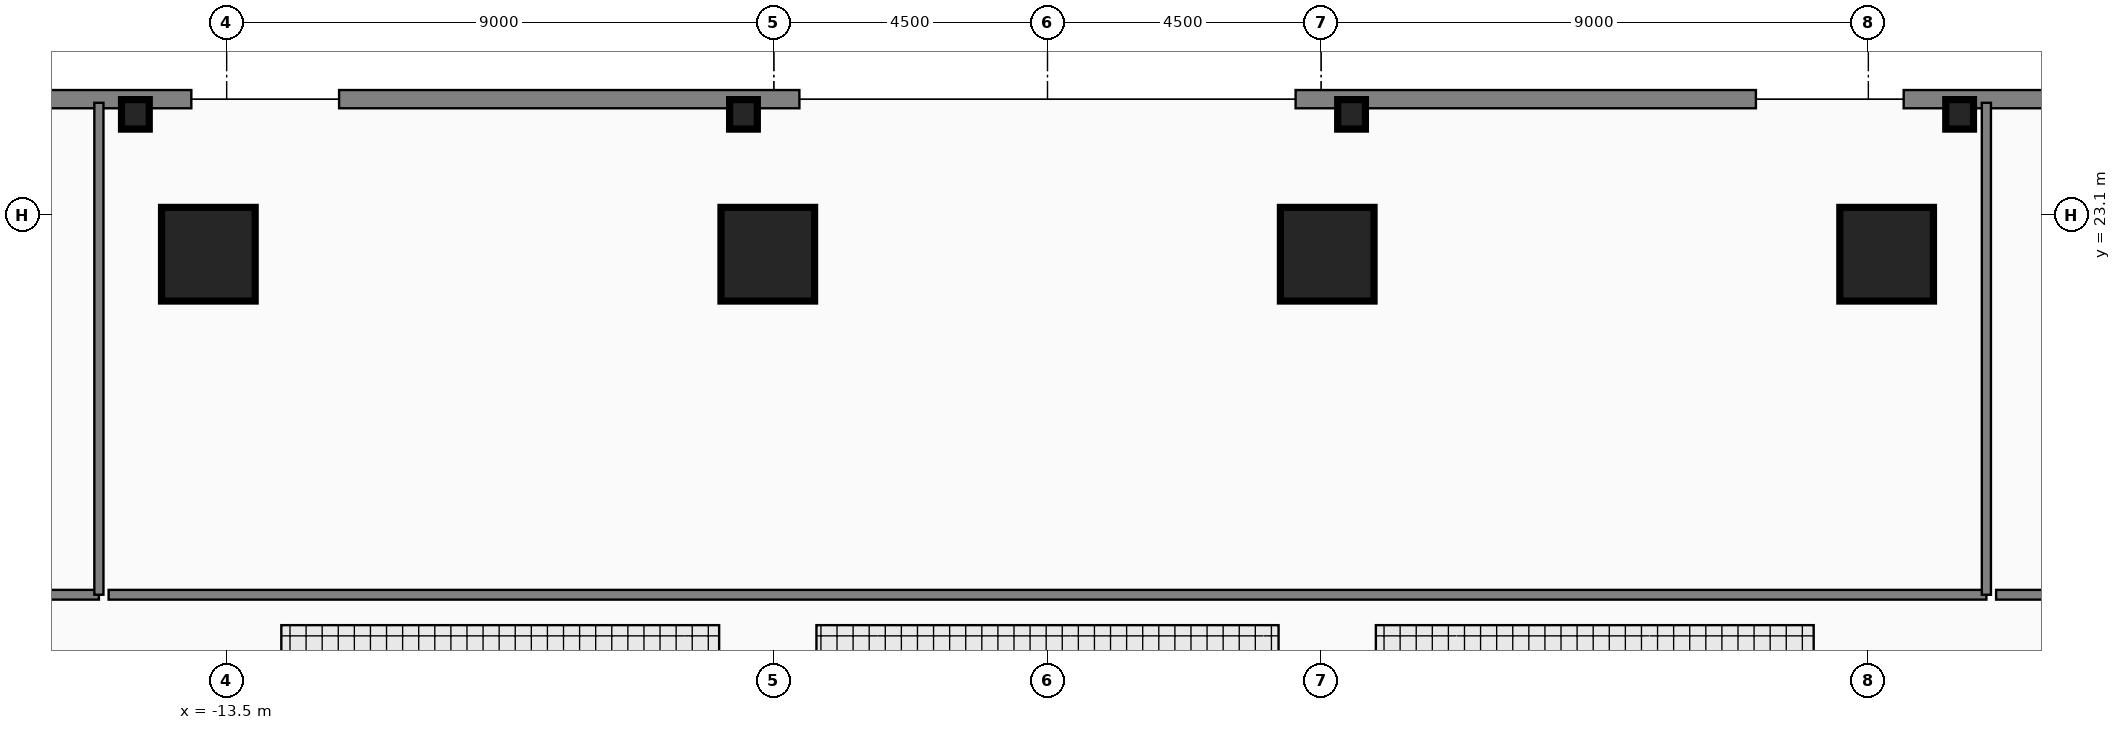
"""IFC4 building model, lengths in metres.
Left out: names, types, materials, properties, quantities, classifications, styles, units other than length and angle.
Written with IfcOpenShell. Run it as: python <this file> out.ifc"""

import sys

from ifc_helpers import new_model, si_unit, direction, frame, frame_2d, origin, origin_2d, place, context, subcontext, project, spatial, rectangle, i_section, extrude, element, fill, save


model = new_model("IFC4")
c1 = context("Model", 3, precision=1e-05, world=origin(), true_north=direction((0.0, 1.0)))
c2 = subcontext(c1, "Body", "Model", "MODEL_VIEW")
j1 = project(units=[si_unit("LENGTHUNIT", "METRE"), si_unit("PLANEANGLEUNIT", "RADIAN")], contexts=[c1])
p1 = place(None, origin())
s1 = spatial("IfcSite", under=j1, at=p1, CompositionType="ELEMENT")
p2 = place(p1, origin())
s2 = spatial("IfcBuilding", under=s1, at=p2, CompositionType="ELEMENT")
p3 = place(p2, origin())
s3 = spatial("IfcBuildingStorey", under=s2, at=p3, CompositionType="ELEMENT", Elevation=0.0)
for number, where, z_axis, x_axis in (
    (1, (-13.8, 22.45, 0.0), (0.0, 0.0, 1.0), (1.0, 0.0, 0.0)),
    (2, (-4.6, 22.45, 0.0), (0.0, 0.0, 1.0), (1.0, 0.0, 0.0)),
    (3, (4.6, 22.45, 0.0), (0.0, 0.0, 1.0), (1.0, 0.0, 0.0)),
    (4, (13.8, 22.45, 0.0), (0.0, 0.0, 1.0), (1.0, 0.0, 0.0)),
):
    element("IfcColumn", number, at=place(p3, frame(where, z_axis=z_axis, x_axis=x_axis)), inside=s3, PredefinedType="COLUMN", context=c2, shape_type="SweptSolid", body=[
        extrude(rectangle(XDim=1.5, YDim=1.5, at=origin_2d()), origin(), (0.0, 0.0, 1.0), 6.0),
    ])
for number, where, z_axis, x_axis in (
    (5, (-15.0, 24.75, -0.27), (0.0, 0.0, 1.0), (1.0, 0.0, 0.0)),
    (6, (-5.0, 24.75, -0.27), (0.0, 0.0, 1.0), (1.0, 0.0, 0.0)),
    (7, (5.0, 24.75, -0.27), (0.0, 0.0, 1.0), (1.0, 0.0, 0.0)),
    (8, (15.0, 24.75, -0.27), (0.0, 0.0, 1.0), (1.0, 0.0, 0.0)),
):
    element("IfcColumn", number, at=place(p3, frame(where, z_axis=z_axis, x_axis=x_axis)), inside=s3, PredefinedType="PILASTER", context=c2, shape_type="SweptSolid", body=[
        extrude(i_section(OverallWidth=0.416, OverallDepth=0.445, WebThickness=0.039, FlangeThickness=0.063, at=origin_2d()), origin(), (0.0, 0.0, 1.0), 6.02),
    ])
p4 = place(p3, frame((-28.35, 25.0, 0.0), z_axis=(0.0, 0.0, 1.0), x_axis=(1.0, 0.0, 0.0)))
e9 = element("IfcWall", 9, at=p4, inside=s3, PredefinedType="STANDARD", context=c2, shape_type="SweptSolid", body=[
    extrude(rectangle(XDim=14.27, YDim=0.3, at=frame_2d((7.135, 0.0))), origin(), (0.0, 0.0, 1.0), 5.75),
])
p5 = place(p4, frame((7.35, 0.0, 0.0)))
e10 = element("IfcOpeningElement", 10, at=p5, cuts=e9, PredefinedType="OPENING", context=c2, shape_type="SweptSolid", body=[
    extrude(rectangle(XDim=2.4, YDim=2.45, at=frame_2d((1.2, 1.225))), frame((0.0, 0.16, 0.0), z_axis=(0.0, -1.0, 0.0), x_axis=(1.0, 0.0, 0.0)), (0.0, 0.0, 1.0), 0.32),
])
p6 = place(p4, frame((4.25, 0.0, 0.9)))
e11 = element("IfcOpeningElement", 11, at=p6, cuts=e9, PredefinedType="OPENING", context=c2, shape_type="SweptSolid", body=[
    extrude(rectangle(XDim=2.4, YDim=2.2, at=frame_2d((1.2, 1.1))), frame((0.0, 0.16, 0.0), z_axis=(0.0, -1.0, 0.0), x_axis=(1.0, 0.0, 0.0)), (0.0, 0.0, 1.0), 0.32),
])
p7 = place(p3, frame((-11.65, 25.0, 0.0), z_axis=(0.0, 0.0, 1.0), x_axis=(1.0, 0.0, 0.0)))
e12 = element("IfcWall", 12, at=p7, inside=s3, PredefinedType="STANDARD", context=c2, shape_type="SweptSolid", body=[
    extrude(rectangle(XDim=7.57, YDim=0.3, at=frame_2d((3.785, 0.0))), origin(), (0.0, 0.0, 1.0), 5.75),
])
p8 = place(p7, frame((0.65, 0.0, 0.0)))
e13 = element("IfcOpeningElement", 13, at=p8, cuts=e12, PredefinedType="OPENING", context=c2, shape_type="SweptSolid", body=[
    extrude(rectangle(XDim=2.4, YDim=2.45, at=frame_2d((1.2, 1.225))), frame((0.0, 0.16, 0.0), z_axis=(0.0, -1.0, 0.0), x_axis=(1.0, 0.0, 0.0)), (0.0, 0.0, 1.0), 0.32),
])
p9 = place(p3, frame((4.08, 25.0, 0.0), z_axis=(0.0, 0.0, 1.0), x_axis=(1.0, 0.0, 0.0)))
e14 = element("IfcWall", 14, at=p9, inside=s3, PredefinedType="STANDARD", context=c2, shape_type="SweptSolid", body=[
    extrude(rectangle(XDim=7.57, YDim=0.3, at=frame_2d((3.785, 0.0))), origin(), (0.0, 0.0, 1.0), 5.75),
])
p10 = place(p9, frame((4.52, 0.0, 0.0)))
e15 = element("IfcOpeningElement", 15, at=p10, cuts=e14, PredefinedType="OPENING", context=c2, shape_type="SweptSolid", body=[
    extrude(rectangle(XDim=2.4, YDim=2.45, at=frame_2d((1.2, 1.225))), frame((0.0, 0.16, 0.0), z_axis=(0.0, -1.0, 0.0), x_axis=(1.0, 0.0, 0.0)), (0.0, 0.0, 1.0), 0.32),
])
p11 = place(p3, frame((14.08, 25.0, 0.0), z_axis=(0.0, 0.0, 1.0), x_axis=(1.0, 0.0, 0.0)))
e16 = element("IfcWall", 16, at=p11, inside=s3, PredefinedType="STANDARD", context=c2, shape_type="SweptSolid", body=[
    extrude(rectangle(XDim=7.57, YDim=0.3, at=frame_2d((3.785, 0.0))), origin(), (0.0, 0.0, 1.0), 5.75),
])
p12 = place(p11, frame((4.52, 0.0, 0.0)))
e17 = element("IfcOpeningElement", 17, at=p12, cuts=e16, PredefinedType="OPENING", context=c2, shape_type="SweptSolid", body=[
    extrude(rectangle(XDim=2.4, YDim=2.45, at=frame_2d((1.2, 1.225))), frame((0.0, 0.16, 0.0), z_axis=(0.0, -1.0, 0.0), x_axis=(1.0, 0.0, 0.0)), (0.0, 0.0, 1.0), 0.32),
])
p13 = place(p3, frame((-27.9, 16.85, 0.0), z_axis=(0.0, 0.0, 1.0), x_axis=(1.0, 0.0, 0.0)))
e18 = element("IfcWall", 18, at=p13, inside=s3, PredefinedType="PARTITIONING", context=c2, shape_type="SweptSolid", body=[
    extrude(rectangle(XDim=12.3, YDim=0.16, at=frame_2d((6.15, 0.0))), origin(), (0.0, 0.0, 1.0), 5.75),
])
p14 = place(p13, frame((7.01, 0.0, 0.0)))
e19 = element("IfcOpeningElement", 19, at=p14, cuts=e18, PredefinedType="OPENING", context=c2, shape_type="SweptSolid", body=[
    extrude(rectangle(XDim=1.08, YDim=2.18, at=frame_2d((0.54, 1.09))), frame((0.0, 0.09, 0.0), z_axis=(0.0, -1.0, 0.0), x_axis=(1.0, 0.0, 0.0)), (0.0, 0.0, 1.0), 0.18),
])
p15 = place(p3, frame((-15.44, 16.85, 0.0), z_axis=(0.0, 0.0, 1.0), x_axis=(1.0, 0.0, 0.0)))
e20 = element("IfcWall", 20, at=p15, inside=s3, PredefinedType="PARTITIONING", context=c2, shape_type="SweptSolid", body=[
    extrude(rectangle(XDim=30.88, YDim=0.16, at=frame_2d((15.44, 0.0))), origin(), (0.0, 0.0, 1.0), 5.217),
])
p16 = place(p15, frame((14.9, 0.0, 0.0)))
e21 = element("IfcOpeningElement", 21, at=p16, cuts=e20, PredefinedType="OPENING", context=c2, shape_type="SweptSolid", body=[
    extrude(rectangle(XDim=1.08, YDim=2.18, at=frame_2d((0.54, 1.09))), frame((0.0, 0.09, 0.0), z_axis=(0.0, -1.0, 0.0), x_axis=(1.0, 0.0, 0.0)), (0.0, 0.0, 1.0), 0.18),
])
p17 = place(p3, frame((15.6, 16.85, 0.0), z_axis=(0.0, 0.0, 1.0), x_axis=(1.0, 0.0, 0.0)))
e22 = element("IfcWall", 22, at=p17, inside=s3, PredefinedType="PARTITIONING", context=c2, shape_type="SweptSolid", body=[
    extrude(rectangle(XDim=9.05, YDim=0.16, at=frame_2d((4.525, 0.0))), origin(), (0.0, 0.0, 1.0), 5.75),
])
p18 = place(p17, frame((3.985, 0.0, 0.0)))
e23 = element("IfcOpeningElement", 23, at=p18, cuts=e22, PredefinedType="OPENING", context=c2, shape_type="SweptSolid", body=[
    extrude(rectangle(XDim=1.08, YDim=2.18, at=frame_2d((0.54, 1.09))), frame((0.0, 0.09, 0.0), z_axis=(0.0, -1.0, 0.0), x_axis=(1.0, 0.0, 0.0)), (0.0, 0.0, 1.0), 0.18),
])
for number, where, z_axis, x_axis in (
    (24, (-15.6, 16.85, 0.0), (0.0, 0.0, 1.0), (0.0, 1.0, 0.0)),
    (25, (15.44, 16.85, 0.0), (0.0, 0.0, 1.0), (0.0, 1.0, 0.0)),
):
    element("IfcWall", number, at=place(p3, frame(where, z_axis=z_axis, x_axis=x_axis)), inside=s3, PredefinedType="PARTITIONING", context=c2, shape_type="SweptSolid", body=[
        extrude(rectangle(XDim=8.09, YDim=0.15, at=frame_2d((4.045, 0.0))), origin(), (0.0, 0.0, 1.0), 5.75),
    ])
p19 = place(p8, origin())
e26 = element("IfcDoor", 26, at=p19, inside=s3, OperationType="DOUBLE_DOOR_SINGLE_SWING", PredefinedType="DOOR", context=c2, shape_type="SweptSolid", body=[
    extrude(rectangle(XDim=2.4, YDim=2.45, at=frame_2d((1.2, 1.225))), frame((0.0, 0.025, 0.0), z_axis=(0.0, -1.0, 0.0), x_axis=(1.0, 0.0, 0.0)), (0.0, 0.0, 1.0), 0.05),
])
fill(e13, e26)
p20 = place(p10, origin())
e27 = element("IfcDoor", 27, at=p20, inside=s3, OperationType="DOUBLE_DOOR_SINGLE_SWING", PredefinedType="DOOR", context=c2, shape_type="SweptSolid", body=[
    extrude(rectangle(XDim=2.4, YDim=2.45, at=frame_2d((1.2, 1.225))), frame((0.0, 0.025, 0.0), z_axis=(0.0, -1.0, 0.0), x_axis=(1.0, 0.0, 0.0)), (0.0, 0.0, 1.0), 0.05),
])
fill(e15, e27)
p21 = place(p16, origin())
e28 = element("IfcDoor", 28, at=p21, inside=s3, OperationType="SINGLE_SWING_LEFT", PredefinedType="DOOR", context=c2, shape_type="SweptSolid", body=[
    extrude(rectangle(XDim=1.08, YDim=2.18, at=frame_2d((0.54, 1.09))), frame((0.0, 0.025, 0.0), z_axis=(0.0, -1.0, 0.0), x_axis=(1.0, 0.0, 0.0)), (0.0, 0.0, 1.0), 0.05),
])
fill(e21, e28)
save(model, sys.argv[1])
